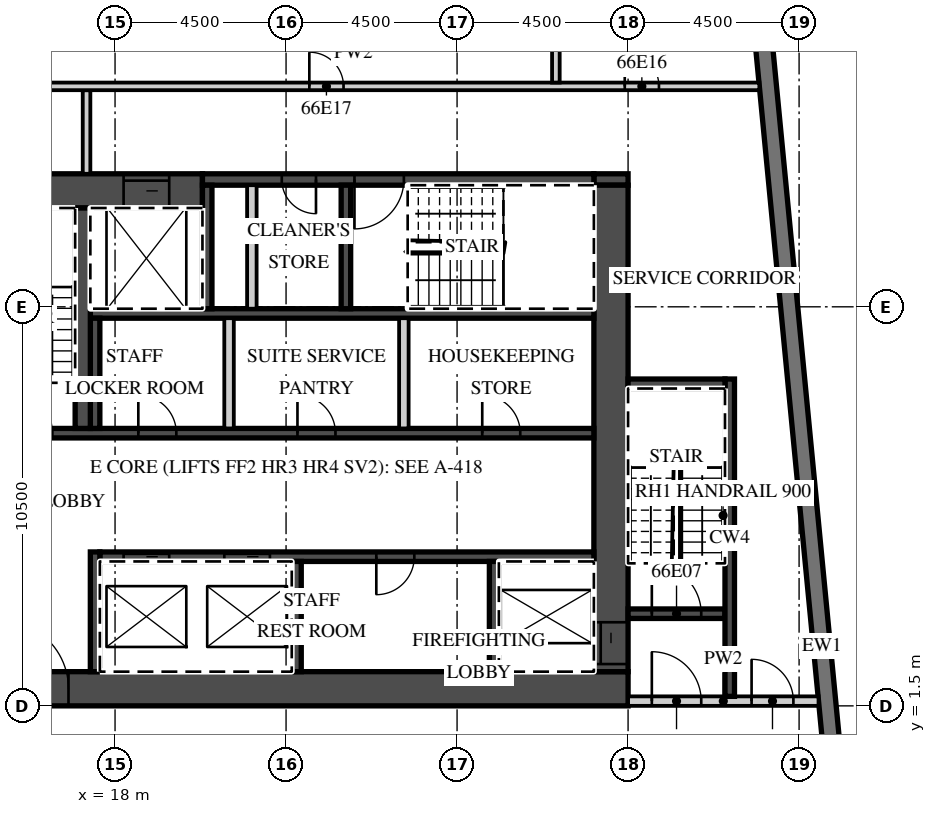
"""IFC4 building model, lengths in metres.
Left out: names, types, materials, properties, quantities, classifications, styles, units other than length and angle.
Written with IfcOpenShell. Run it as: python <this file> out.ifc"""

import sys

from ifc_helpers import new_model, si_unit, direction, frame, frame_2d, origin, place, context, subcontext, project, spatial, rectangle, extrude, element, fill, save


model = new_model("IFC4")
c1 = context("Model", 3, precision=1e-05, world=origin(), true_north=direction((0.0, 1.0)))
c2 = subcontext(c1, "Body", "Model", "MODEL_VIEW")
j1 = project(units=[si_unit("LENGTHUNIT", "METRE"), si_unit("PLANEANGLEUNIT", "RADIAN")], contexts=[c1])
p1 = place(None, origin())
s1 = spatial("IfcSite", under=j1, at=p1, CompositionType="ELEMENT")
p2 = place(p1, origin())
s2 = spatial("IfcBuilding", under=s1, at=p2, CompositionType="ELEMENT")
p3 = place(p2, frame((0.0, 0.0, 268.5)))
s3 = spatial("IfcBuildingStorey", under=s2, at=p3, CompositionType="ELEMENT", Elevation=268.5)
p4 = place(p3, frame((38.132, -12.858, 0.0), z_axis=(0.0, 0.0, 1.0), x_axis=(-0.095847749461, 0.995396006082, 0.0)))
e1 = element("IfcWall", 1, at=p4, inside=s3, PredefinedType="SOLIDWALL", context=c2, shape_type="SweptSolid", body=[
    extrude(rectangle(XDim=32.0, YDim=0.45, at=frame_2d((16.0, 0.0))), origin(), (0.0, 0.0, 1.0), 3.02),
])
p5 = place(p3, frame((13.5, 1.95, 0.0), z_axis=(0.0, 0.0, 1.0), x_axis=(1.0, 0.0, 0.0)))
e2 = element("IfcWall", 2, at=p5, inside=s3, PredefinedType="SHEAR", context=c2, shape_type="SweptSolid", body=[
    extrude(rectangle(XDim=18.0, YDim=0.9, at=frame_2d((9.0, 0.0))), origin(), (0.0, 0.0, 1.0), 3.02),
])
p6 = place(p5, frame((1.475, 0.0, 0.0)))
e3 = element("IfcOpeningElement", 3, at=p6, cuts=e2, PredefinedType="OPENING", context=c2, shape_type="SweptSolid", body=[
    extrude(rectangle(XDim=1.8, YDim=2.1, at=frame_2d((0.9, 1.05))), frame((0.0, 0.46, 0.0), z_axis=(0.0, -1.0, 0.0), x_axis=(1.0, 0.0, 0.0)), (0.0, 0.0, 1.0), 0.92),
])
p7 = place(p3, frame((13.5, 15.05, 0.0), z_axis=(0.0, 0.0, 1.0), x_axis=(1.0, 0.0, 0.0)))
e4 = element("IfcWall", 4, at=p7, inside=s3, PredefinedType="SHEAR", context=c2, shape_type="SweptSolid", body=[
    extrude(rectangle(XDim=6.8, YDim=0.9, at=frame_2d((3.4, 0.0))), origin(), (0.0, 0.0, 1.0), 3.02),
])
p8 = place(p7, frame((4.725, 0.0, 0.0)))
e5 = element("IfcOpeningElement", 5, at=p8, cuts=e4, PredefinedType="OPENING", context=c2, shape_type="SweptSolid", body=[
    extrude(rectangle(XDim=1.2, YDim=2.1, at=frame_2d((0.6, 1.05))), frame((0.0, 0.46, 0.0), z_axis=(0.0, -1.0, 0.0), x_axis=(1.0, 0.0, 0.0)), (0.0, 0.0, 1.0), 0.92),
])
p9 = place(p3, frame((30.6, 15.35, 0.0), z_axis=(0.0, 0.0, 1.0), x_axis=(1.0, 0.0, 0.0)))
e6 = element("IfcWall", 6, at=p9, inside=s3, PredefinedType="SHEAR", context=c2, shape_type="SweptSolid", body=[
    extrude(rectangle(XDim=0.9, YDim=0.3, at=frame_2d((0.45, 0.0))), origin(), (0.0, 0.0, 1.0), 3.02),
])
p10 = place(p3, frame((20.3, 15.35, 0.0), z_axis=(0.0, 0.0, 1.0), x_axis=(1.0, 0.0, 0.0)))
e7 = element("IfcWall", 7, at=p10, inside=s3, PredefinedType="SHEAR", context=c2, shape_type="SweptSolid", body=[
    extrude(rectangle(XDim=10.3, YDim=0.3, at=frame_2d((5.15, 0.0))), origin(), (0.0, 0.0, 1.0), 3.02),
])
p11 = place(p10, frame((4.0, 0.0, 0.0)))
e8 = element("IfcOpeningElement", 8, at=p11, cuts=e7, PredefinedType="OPENING", context=c2, shape_type="SweptSolid", body=[
    extrude(rectangle(XDim=1.3, YDim=2.1, at=frame_2d((0.65, 1.05))), frame((0.0, 0.16, 0.0), z_axis=(0.0, -1.0, 0.0), x_axis=(1.0, 0.0, 0.0)), (0.0, 0.0, 1.0), 0.32),
])
p12 = place(p10, frame((2.087, 0.0, 0.0)))
e9 = element("IfcOpeningElement", 9, at=p12, cuts=e7, PredefinedType="OPENING", context=c2, shape_type="SweptSolid", body=[
    extrude(rectangle(XDim=0.9, YDim=2.1, at=frame_2d((0.45, 1.05))), frame((0.0, 0.16, 0.0), z_axis=(0.0, -1.0, 0.0), x_axis=(1.0, 0.0, 0.0)), (0.0, 0.0, 1.0), 0.32),
])
p13 = place(p3, frame((31.05, 2.4, 0.0), z_axis=(0.0, 0.0, 1.0), x_axis=(0.0, 1.0, 0.0)))
e10 = element("IfcWall", 10, at=p13, inside=s3, PredefinedType="SHEAR", context=c2, shape_type="SweptSolid", body=[
    extrude(rectangle(XDim=12.8, YDim=0.9, at=frame_2d((6.4, 0.0))), origin(), (0.0, 0.0, 1.0), 3.02),
])
p14 = place(p13, frame((0.2, 0.0, 0.0)))
e11 = element("IfcOpeningElement", 11, at=p14, cuts=e10, PredefinedType="OPENING", context=c2, shape_type="SweptSolid", body=[
    extrude(rectangle(XDim=1.1, YDim=2.1, at=frame_2d((0.55, 1.05))), frame((0.0, 0.46, 0.0), z_axis=(0.0, -1.0, 0.0), x_axis=(1.0, 0.0, 0.0)), (0.0, 0.0, 1.0), 0.92),
])
p15 = place(p3, frame((17.6, 5.425, 0.0), z_axis=(0.0, 0.0, 1.0), x_axis=(1.0, 0.0, 0.0)))
e12 = element("IfcWall", 12, at=p15, inside=s3, PredefinedType="SHEAR", context=c2, shape_type="SweptSolid", body=[
    extrude(rectangle(XDim=13.0, YDim=0.25, at=frame_2d((6.5, 0.0))), origin(), (0.0, 0.0, 1.0), 3.02),
])
p16 = place(p15, frame((3.275, 0.0, 0.0)))
e13 = element("IfcOpeningElement", 13, at=p16, cuts=e12, PredefinedType="OPENING", context=c2, shape_type="SweptSolid", body=[
    extrude(rectangle(XDim=1.2, YDim=2.1, at=frame_2d((0.6, 1.05))), frame((0.0, 0.135, 0.0), z_axis=(0.0, -1.0, 0.0), x_axis=(1.0, 0.0, 0.0)), (0.0, 0.0, 1.0), 0.27),
])
p17 = place(p15, frame((0.625, 0.0, 0.0)))
e14 = element("IfcOpeningElement", 14, at=p17, cuts=e12, PredefinedType="OPENING", context=c2, shape_type="SweptSolid", body=[
    extrude(rectangle(XDim=1.2, YDim=2.1, at=frame_2d((0.6, 1.05))), frame((0.0, 0.135, 0.0), z_axis=(0.0, -1.0, 0.0), x_axis=(1.0, 0.0, 0.0)), (0.0, 0.0, 1.0), 0.27),
])
p18 = place(p15, frame((7.275, 0.0, 0.0)))
e15 = element("IfcOpeningElement", 15, at=p18, cuts=e12, PredefinedType="OPENING", context=c2, shape_type="SweptSolid", body=[
    extrude(rectangle(XDim=1.0, YDim=2.1, at=frame_2d((0.5, 1.05))), frame((0.0, 0.135, 0.0), z_axis=(0.0, -1.0, 0.0), x_axis=(1.0, 0.0, 0.0)), (0.0, 0.0, 1.0), 0.27),
])
p19 = place(p3, frame((17.475, 2.4, 0.0), z_axis=(0.0, 0.0, 1.0), x_axis=(0.0, 1.0, 0.0)))
e16 = element("IfcWall", 16, at=p19, inside=s3, PredefinedType="SHEAR", context=c2, shape_type="SweptSolid", body=[
    extrude(rectangle(XDim=3.15, YDim=0.25, at=frame_2d((1.575, 0.0))), origin(), (0.0, 0.0, 1.0), 3.02),
])
for number, where, z_axis, x_axis in (
    (17, (27.975, 2.4, 0.0), (0.0, 0.0, 1.0), (0.0, 1.0, 0.0)),
    (18, (22.775, 2.4, 0.0), (0.0, 0.0, 1.0), (0.0, 1.0, 0.0)),
):
    element("IfcWall", number, at=place(p3, frame(where, z_axis=z_axis, x_axis=x_axis)), inside=s3, PredefinedType="SHEAR", context=c2, shape_type="SweptSolid", body=[
        extrude(rectangle(XDim=2.9, YDim=0.25, at=frame_2d((1.45, 0.0))), origin(), (0.0, 0.0, 1.0), 3.02),
    ])
p20 = place(p3, frame((14.4, 8.675, 0.0), z_axis=(0.0, 0.0, 1.0), x_axis=(1.0, 0.0, 0.0)))
e19 = element("IfcWall", 19, at=p20, inside=s3, PredefinedType="SHEAR", context=c2, shape_type="SweptSolid", body=[
    extrude(rectangle(XDim=16.2, YDim=0.25, at=frame_2d((8.1, 0.0))), origin(), (0.0, 0.0, 1.0), 3.02),
])
p21 = place(p20, frame((0.65, 0.0, 0.0)))
e20 = element("IfcOpeningElement", 20, at=p21, cuts=e19, PredefinedType="OPENING", context=c2, shape_type="SweptSolid", body=[
    extrude(rectangle(XDim=1.3, YDim=2.1, at=frame_2d((0.65, 1.05))), frame((0.0, 0.135, 0.0), z_axis=(0.0, -1.0, 0.0), x_axis=(1.0, 0.0, 0.0)), (0.0, 0.0, 1.0), 0.27),
])
p22 = place(p20, frame((13.262, 0.0, 0.0)))
e21 = element("IfcOpeningElement", 21, at=p22, cuts=e19, PredefinedType="OPENING", context=c2, shape_type="SweptSolid", body=[
    extrude(rectangle(XDim=1.0, YDim=2.1, at=frame_2d((0.5, 1.05))), frame((0.0, 0.135, 0.0), z_axis=(0.0, -1.0, 0.0), x_axis=(1.0, 0.0, 0.0)), (0.0, 0.0, 1.0), 0.27),
])
p23 = place(p20, frame((8.4, 0.0, 0.0)))
e22 = element("IfcOpeningElement", 22, at=p23, cuts=e19, PredefinedType="OPENING", context=c2, shape_type="SweptSolid", body=[
    extrude(rectangle(XDim=1.0, YDim=2.1, at=frame_2d((0.5, 1.05))), frame((0.0, 0.135, 0.0), z_axis=(0.0, -1.0, 0.0), x_axis=(1.0, 0.0, 0.0)), (0.0, 0.0, 1.0), 0.27),
])
p24 = place(p20, frame((4.212, 0.0, 0.0)))
e23 = element("IfcOpeningElement", 23, at=p24, cuts=e19, PredefinedType="OPENING", context=c2, shape_type="SweptSolid", body=[
    extrude(rectangle(XDim=1.0, YDim=2.1, at=frame_2d((0.5, 1.05))), frame((0.0, 0.135, 0.0), z_axis=(0.0, -1.0, 0.0), x_axis=(1.0, 0.0, 0.0)), (0.0, 0.0, 1.0), 0.27),
])
p25 = place(p3, frame((17.35, 11.825, 0.0), z_axis=(0.0, 0.0, 1.0), x_axis=(1.0, 0.0, 0.0)))
e24 = element("IfcWall", 24, at=p25, inside=s3, PredefinedType="SHEAR", context=c2, shape_type="SweptSolid", body=[
    extrude(rectangle(XDim=13.25, YDim=0.25, at=frame_2d((6.625, 0.0))), origin(), (0.0, 0.0, 1.0), 3.02),
])
p26 = place(p3, frame((17.475, 8.8, 0.0), z_axis=(0.0, 0.0, 1.0), x_axis=(0.0, 1.0, 0.0)))
e25 = element("IfcWall", 25, at=p26, inside=s3, PredefinedType="SHEAR", context=c2, shape_type="SweptSolid", body=[
    extrude(rectangle(XDim=2.9, YDim=0.25, at=frame_2d((1.45, 0.0))), origin(), (0.0, 0.0, 1.0), 3.02),
])
for number, where, z_axis, x_axis in (
    (26, (25.6, 8.8, 0.0), (0.0, 0.0, 1.0), (0.0, 1.0, 0.0)),
    (27, (21.0, 8.8, 0.0), (0.0, 0.0, 1.0), (0.0, 1.0, 0.0)),
):
    element("IfcWall", number, at=place(p3, frame(where, z_axis=z_axis, x_axis=x_axis)), inside=s3, PredefinedType="PARTITIONING", context=c2, shape_type="SweptSolid", body=[
        extrude(rectangle(XDim=2.9, YDim=0.25, at=frame_2d((1.45, 0.0))), origin(), (0.0, 0.0, 1.0), 3.02),
    ])
p27 = place(p3, frame((17.15, 8.8, 0.0), z_axis=(0.0, 0.0, 1.0), x_axis=(0.0, 1.0, 0.0)))
e28 = element("IfcWall", 28, at=p27, inside=s3, PredefinedType="SHEAR", context=c2, shape_type="SweptSolid", body=[
    extrude(rectangle(XDim=5.8, YDim=0.4, at=frame_2d((2.9, 0.0))), origin(), (0.0, 0.0, 1.0), 3.02),
])
for number, where, z_axis, x_axis in (
    (29, (20.425, 11.95, 0.0), (0.0, 0.0, 1.0), (0.0, 1.0, 0.0)),
    (30, (24.075, 11.95, 0.0), (0.0, 0.0, 1.0), (0.0, 1.0, 0.0)),
):
    element("IfcWall", number, at=place(p3, frame(where, z_axis=z_axis, x_axis=x_axis)), inside=s3, PredefinedType="SHEAR", context=c2, shape_type="SweptSolid", body=[
        extrude(rectangle(XDim=3.25, YDim=0.25, at=frame_2d((1.625, 0.0))), origin(), (0.0, 0.0, 1.0), 3.02),
    ])
p28 = place(p3, frame((21.6, 11.95, 0.0), z_axis=(0.0, 0.0, 1.0), x_axis=(0.0, 1.0, 0.0)))
e31 = element("IfcWall", 31, at=p28, inside=s3, PredefinedType="PARTITIONING", context=c2, shape_type="SweptSolid", body=[
    extrude(rectangle(XDim=3.25, YDim=0.25, at=frame_2d((1.625, 0.0))), origin(), (0.0, 0.0, 1.0), 3.02),
])
p29 = place(p3, frame((31.5, 1.625, 0.0), z_axis=(0.0, 0.0, 1.0), x_axis=(1.0, 0.0, 0.0)))
e32 = element("IfcWall", 32, at=p29, inside=s3, PredefinedType="PARTITIONING", context=c2, shape_type="SweptSolid", body=[
    extrude(rectangle(XDim=5.012, YDim=0.25, at=frame_2d((2.506, 0.0))), origin(), (0.0, 0.0, 1.0), 3.02),
])
p30 = place(p29, frame((0.625, 0.0, 0.0)))
e33 = element("IfcOpeningElement", 33, at=p30, cuts=e32, PredefinedType="OPENING", context=c2, shape_type="SweptSolid", body=[
    extrude(rectangle(XDim=1.3, YDim=2.1, at=frame_2d((0.65, 1.05))), frame((0.0, 0.135, 0.0), z_axis=(0.0, -1.0, 0.0), x_axis=(1.0, 0.0, 0.0)), (0.0, 0.0, 1.0), 0.27),
])
p31 = place(p29, frame((3.25, 0.0, 0.0)))
e34 = element("IfcOpeningElement", 34, at=p31, cuts=e32, PredefinedType="OPENING", context=c2, shape_type="SweptSolid", body=[
    extrude(rectangle(XDim=1.1, YDim=2.1, at=frame_2d((0.55, 1.05))), frame((0.0, 0.135, 0.0), z_axis=(0.0, -1.0, 0.0), x_axis=(1.0, 0.0, 0.0)), (0.0, 0.0, 1.0), 0.27),
])
p32 = place(p3, frame((31.5, 3.925, 0.0), z_axis=(0.0, 0.0, 1.0), x_axis=(1.0, 0.0, 0.0)))
e35 = element("IfcWall", 35, at=p32, inside=s3, PredefinedType="SHEAR", context=c2, shape_type="SweptSolid", body=[
    extrude(rectangle(XDim=2.55, YDim=0.25, at=frame_2d((1.275, 0.0))), origin(), (0.0, 0.0, 1.0), 3.02),
])
p33 = place(p32, frame((0.625, 0.0, 0.0)))
e36 = element("IfcOpeningElement", 36, at=p33, cuts=e35, PredefinedType="OPENING", context=c2, shape_type="SweptSolid", body=[
    extrude(rectangle(XDim=1.3, YDim=2.1, at=frame_2d((0.65, 1.05))), frame((0.0, 0.135, 0.0), z_axis=(0.0, -1.0, 0.0), x_axis=(1.0, 0.0, 0.0)), (0.0, 0.0, 1.0), 0.27),
])
p34 = place(p3, frame((34.175, 1.75, 0.0), z_axis=(0.0, 0.0, 1.0), x_axis=(0.0, 1.0, 0.0)))
e37 = element("IfcWall", 37, at=p34, inside=s3, PredefinedType="SHEAR", context=c2, shape_type="SweptSolid", body=[
    extrude(rectangle(XDim=8.35, YDim=0.25, at=frame_2d((4.175, 0.0))), origin(), (0.0, 0.0, 1.0), 3.02),
])
p35 = place(p3, frame((31.5, 9.975, 0.0), z_axis=(0.0, 0.0, 1.0), x_axis=(1.0, 0.0, 0.0)))
e38 = element("IfcWall", 38, at=p35, inside=s3, PredefinedType="SHEAR", context=c2, shape_type="SweptSolid", body=[
    extrude(rectangle(XDim=2.55, YDim=0.25, at=frame_2d((1.275, 0.0))), origin(), (0.0, 0.0, 1.0), 3.02),
])
p36 = place(p3, frame((17.25, 15.5, 0.0), z_axis=(0.0, 0.0, 1.0), x_axis=(0.0, 1.0, 0.0)))
e39 = element("IfcWall", 39, at=p36, inside=s3, PredefinedType="PARTITIONING", context=c2, shape_type="SweptSolid", body=[
    extrude(rectangle(XDim=2.2, YDim=0.2, at=frame_2d((1.1, 0.0))), origin(), (0.0, 0.0, 1.0), 3.02),
])
p37 = place(p3, frame((13.6, 17.8, 0.0), z_axis=(0.0, 0.0, 1.0), x_axis=(1.0, 0.0, 0.0)))
e40 = element("IfcWall", 40, at=p37, inside=s3, PredefinedType="PARTITIONING", context=c2, shape_type="SweptSolid", body=[
    extrude(rectangle(XDim=21.354, YDim=0.2, at=frame_2d((10.677, 0.0))), origin(), (0.0, 0.0, 1.0), 3.02),
])
p38 = place(p37, frame((17.812, 0.0, 0.0)))
e41 = element("IfcOpeningElement", 41, at=p38, cuts=e40, PredefinedType="OPENING", context=c2, shape_type="SweptSolid", body=[
    extrude(rectangle(XDim=0.9, YDim=2.1, at=frame_2d((0.45, 1.05))), frame((0.0, 0.11, 0.0), z_axis=(0.0, -1.0, 0.0), x_axis=(1.0, 0.0, 0.0)), (0.0, 0.0, 1.0), 0.22),
])
p39 = place(p37, frame((9.512, 0.0, 0.0)))
e42 = element("IfcOpeningElement", 42, at=p39, cuts=e40, PredefinedType="OPENING", context=c2, shape_type="SweptSolid", body=[
    extrude(rectangle(XDim=0.9, YDim=2.1, at=frame_2d((0.45, 1.05))), frame((0.0, 0.11, 0.0), z_axis=(0.0, -1.0, 0.0), x_axis=(1.0, 0.0, 0.0)), (0.0, 0.0, 1.0), 0.22),
])
p40 = place(p3, frame((29.6, 17.9, 0.0), z_axis=(0.0, 0.0, 1.0), x_axis=(0.0, 1.0, 0.0)))
e43 = element("IfcWall", 43, at=p40, inside=s3, PredefinedType="PARTITIONING", context=c2, shape_type="SweptSolid", body=[
    extrude(rectangle(XDim=4.136, YDim=0.2, at=frame_2d((2.068, 0.0))), origin(), (0.0, 0.0, 1.0), 3.02),
])
p41 = place(p16, origin())
e44 = element("IfcDoor", 44, at=p41, inside=s3, OperationType="SLIDING_TO_RIGHT", PredefinedType="DOOR", context=c2, shape_type="SweptSolid", body=[
    extrude(rectangle(XDim=1.2, YDim=2.1, at=frame_2d((0.6, 1.05))), frame((0.0, 0.025, 0.0), z_axis=(0.0, -1.0, 0.0), x_axis=(1.0, 0.0, 0.0)), (0.0, 0.0, 1.0), 0.05),
])
fill(e13, e44)
p42 = place(p17, origin())
e45 = element("IfcDoor", 45, at=p42, inside=s3, OperationType="SLIDING_TO_LEFT", PredefinedType="DOOR", context=c2, shape_type="SweptSolid", body=[
    extrude(rectangle(XDim=1.2, YDim=2.1, at=frame_2d((0.6, 1.05))), frame((0.0, 0.025, 0.0), z_axis=(0.0, -1.0, 0.0), x_axis=(1.0, 0.0, 0.0)), (0.0, 0.0, 1.0), 0.05),
])
fill(e14, e45)
p43 = place(p8, origin())
e46 = element("IfcDoor", 46, at=p43, inside=s3, OperationType="SLIDING_TO_LEFT", PredefinedType="DOOR", context=c2, shape_type="SweptSolid", body=[
    extrude(rectangle(XDim=1.2, YDim=2.1, at=frame_2d((0.6, 1.05))), frame((0.0, 0.025, 0.0), z_axis=(0.0, -1.0, 0.0), x_axis=(1.0, 0.0, 0.0)), (0.0, 0.0, 1.0), 0.05),
])
fill(e5, e46)
p44 = place(p14, origin())
e47 = element("IfcDoor", 47, at=p44, inside=s3, OperationType="SLIDING_TO_LEFT", PredefinedType="DOOR", context=c2, shape_type="SweptSolid", body=[
    extrude(rectangle(XDim=1.1, YDim=2.1, at=frame_2d((0.55, 1.05))), frame((0.0, 0.025, 0.0), z_axis=(0.0, -1.0, 0.0), x_axis=(1.0, 0.0, 0.0)), (0.0, 0.0, 1.0), 0.05),
])
fill(e11, e47)
p45 = place(p6, origin())
e48 = element("IfcDoor", 48, at=p45, inside=s3, OperationType="DOUBLE_DOOR_DOUBLE_SWING", PredefinedType="DOOR", context=c2, shape_type="SweptSolid", body=[
    extrude(rectangle(XDim=1.8, YDim=2.1, at=frame_2d((0.9, 1.05))), frame((0.0, 0.025, 0.0), z_axis=(0.0, -1.0, 0.0), x_axis=(1.0, 0.0, 0.0)), (0.0, 0.0, 1.0), 0.05),
])
fill(e3, e48)
p46 = place(p30, origin())
e49 = element("IfcDoor", 49, at=p46, inside=s3, OperationType="SINGLE_SWING_LEFT", PredefinedType="DOOR", context=c2, shape_type="SweptSolid", body=[
    extrude(rectangle(XDim=1.3, YDim=2.1, at=frame_2d((0.65, 1.05))), frame((0.0, 0.025, 0.0), z_axis=(0.0, -1.0, 0.0), x_axis=(1.0, 0.0, 0.0)), (0.0, 0.0, 1.0), 0.05),
])
fill(e33, e49)
p47 = place(p33, origin())
e50 = element("IfcDoor", 50, at=p47, inside=s3, OperationType="SINGLE_SWING_LEFT", PredefinedType="DOOR", context=c2, shape_type="SweptSolid", body=[
    extrude(rectangle(XDim=1.3, YDim=2.1, at=frame_2d((0.65, 1.05))), frame((0.0, 0.025, 0.0), z_axis=(0.0, -1.0, 0.0), x_axis=(1.0, 0.0, 0.0)), (0.0, 0.0, 1.0), 0.05),
])
fill(e36, e50)
p48 = place(p31, origin())
e51 = element("IfcDoor", 51, at=p48, inside=s3, OperationType="SINGLE_SWING_LEFT", PredefinedType="DOOR", context=c2, shape_type="SweptSolid", body=[
    extrude(rectangle(XDim=1.1, YDim=2.1, at=frame_2d((0.55, 1.05))), frame((0.0, 0.025, 0.0), z_axis=(0.0, -1.0, 0.0), x_axis=(1.0, 0.0, 0.0)), (0.0, 0.0, 1.0), 0.05),
])
fill(e34, e51)
p49 = place(p11, origin())
e52 = element("IfcDoor", 52, at=p49, inside=s3, OperationType="SINGLE_SWING_LEFT", PredefinedType="DOOR", context=c2, shape_type="SweptSolid", body=[
    extrude(rectangle(XDim=1.3, YDim=2.1, at=frame_2d((0.65, 1.05))), frame((0.0, 0.025, 0.0), z_axis=(0.0, -1.0, 0.0), x_axis=(1.0, 0.0, 0.0)), (0.0, 0.0, 1.0), 0.05),
])
fill(e8, e52)
p50 = place(p12, origin())
e53 = element("IfcDoor", 53, at=p50, inside=s3, OperationType="SINGLE_SWING_RIGHT", PredefinedType="DOOR", context=c2, shape_type="SweptSolid", body=[
    extrude(rectangle(XDim=0.9, YDim=2.1, at=frame_2d((0.45, 1.05))), frame((0.0, 0.025, 0.0), z_axis=(0.0, -1.0, 0.0), x_axis=(1.0, 0.0, 0.0)), (0.0, 0.0, 1.0), 0.05),
])
fill(e9, e53)
p51 = place(p22, origin())
e54 = element("IfcDoor", 54, at=p51, inside=s3, OperationType="SINGLE_SWING_LEFT", PredefinedType="DOOR", context=c2, shape_type="SweptSolid", body=[
    extrude(rectangle(XDim=1.0, YDim=2.1, at=frame_2d((0.5, 1.05))), frame((0.0, 0.025, 0.0), z_axis=(0.0, -1.0, 0.0), x_axis=(1.0, 0.0, 0.0)), (0.0, 0.0, 1.0), 0.05),
])
fill(e21, e54)
p52 = place(p23, origin())
e55 = element("IfcDoor", 55, at=p52, inside=s3, OperationType="SINGLE_SWING_LEFT", PredefinedType="DOOR", context=c2, shape_type="SweptSolid", body=[
    extrude(rectangle(XDim=1.0, YDim=2.1, at=frame_2d((0.5, 1.05))), frame((0.0, 0.025, 0.0), z_axis=(0.0, -1.0, 0.0), x_axis=(1.0, 0.0, 0.0)), (0.0, 0.0, 1.0), 0.05),
])
fill(e22, e55)
p53 = place(p24, origin())
e56 = element("IfcDoor", 56, at=p53, inside=s3, OperationType="SINGLE_SWING_LEFT", PredefinedType="DOOR", context=c2, shape_type="SweptSolid", body=[
    extrude(rectangle(XDim=1.0, YDim=2.1, at=frame_2d((0.5, 1.05))), frame((0.0, 0.025, 0.0), z_axis=(0.0, -1.0, 0.0), x_axis=(1.0, 0.0, 0.0)), (0.0, 0.0, 1.0), 0.05),
])
fill(e23, e56)
p54 = place(p18, origin())
e57 = element("IfcDoor", 57, at=p54, inside=s3, OperationType="SINGLE_SWING_LEFT", PredefinedType="DOOR", context=c2, shape_type="SweptSolid", body=[
    extrude(rectangle(XDim=1.0, YDim=2.1, at=frame_2d((0.5, 1.05))), frame((0.0, 0.025, 0.0), z_axis=(0.0, -1.0, 0.0), x_axis=(1.0, 0.0, 0.0)), (0.0, 0.0, 1.0), 0.05),
])
fill(e15, e57)
p55 = place(p38, origin())
e58 = element("IfcDoor", 58, at=p55, inside=s3, OperationType="SINGLE_SWING_LEFT", PredefinedType="DOOR", context=c2, shape_type="SweptSolid", body=[
    extrude(rectangle(XDim=0.9, YDim=2.1, at=frame_2d((0.45, 1.05))), frame((0.0, 0.025, 0.0), z_axis=(0.0, -1.0, 0.0), x_axis=(1.0, 0.0, 0.0)), (0.0, 0.0, 1.0), 0.05),
])
fill(e41, e58)
p56 = place(p39, origin())
e59 = element("IfcDoor", 59, at=p56, inside=s3, OperationType="SINGLE_SWING_LEFT", PredefinedType="DOOR", context=c2, shape_type="SweptSolid", body=[
    extrude(rectangle(XDim=0.9, YDim=2.1, at=frame_2d((0.45, 1.05))), frame((0.0, 0.025, 0.0), z_axis=(0.0, -1.0, 0.0), x_axis=(1.0, 0.0, 0.0)), (0.0, 0.0, 1.0), 0.05),
])
fill(e42, e59)
save(model, sys.argv[1])
